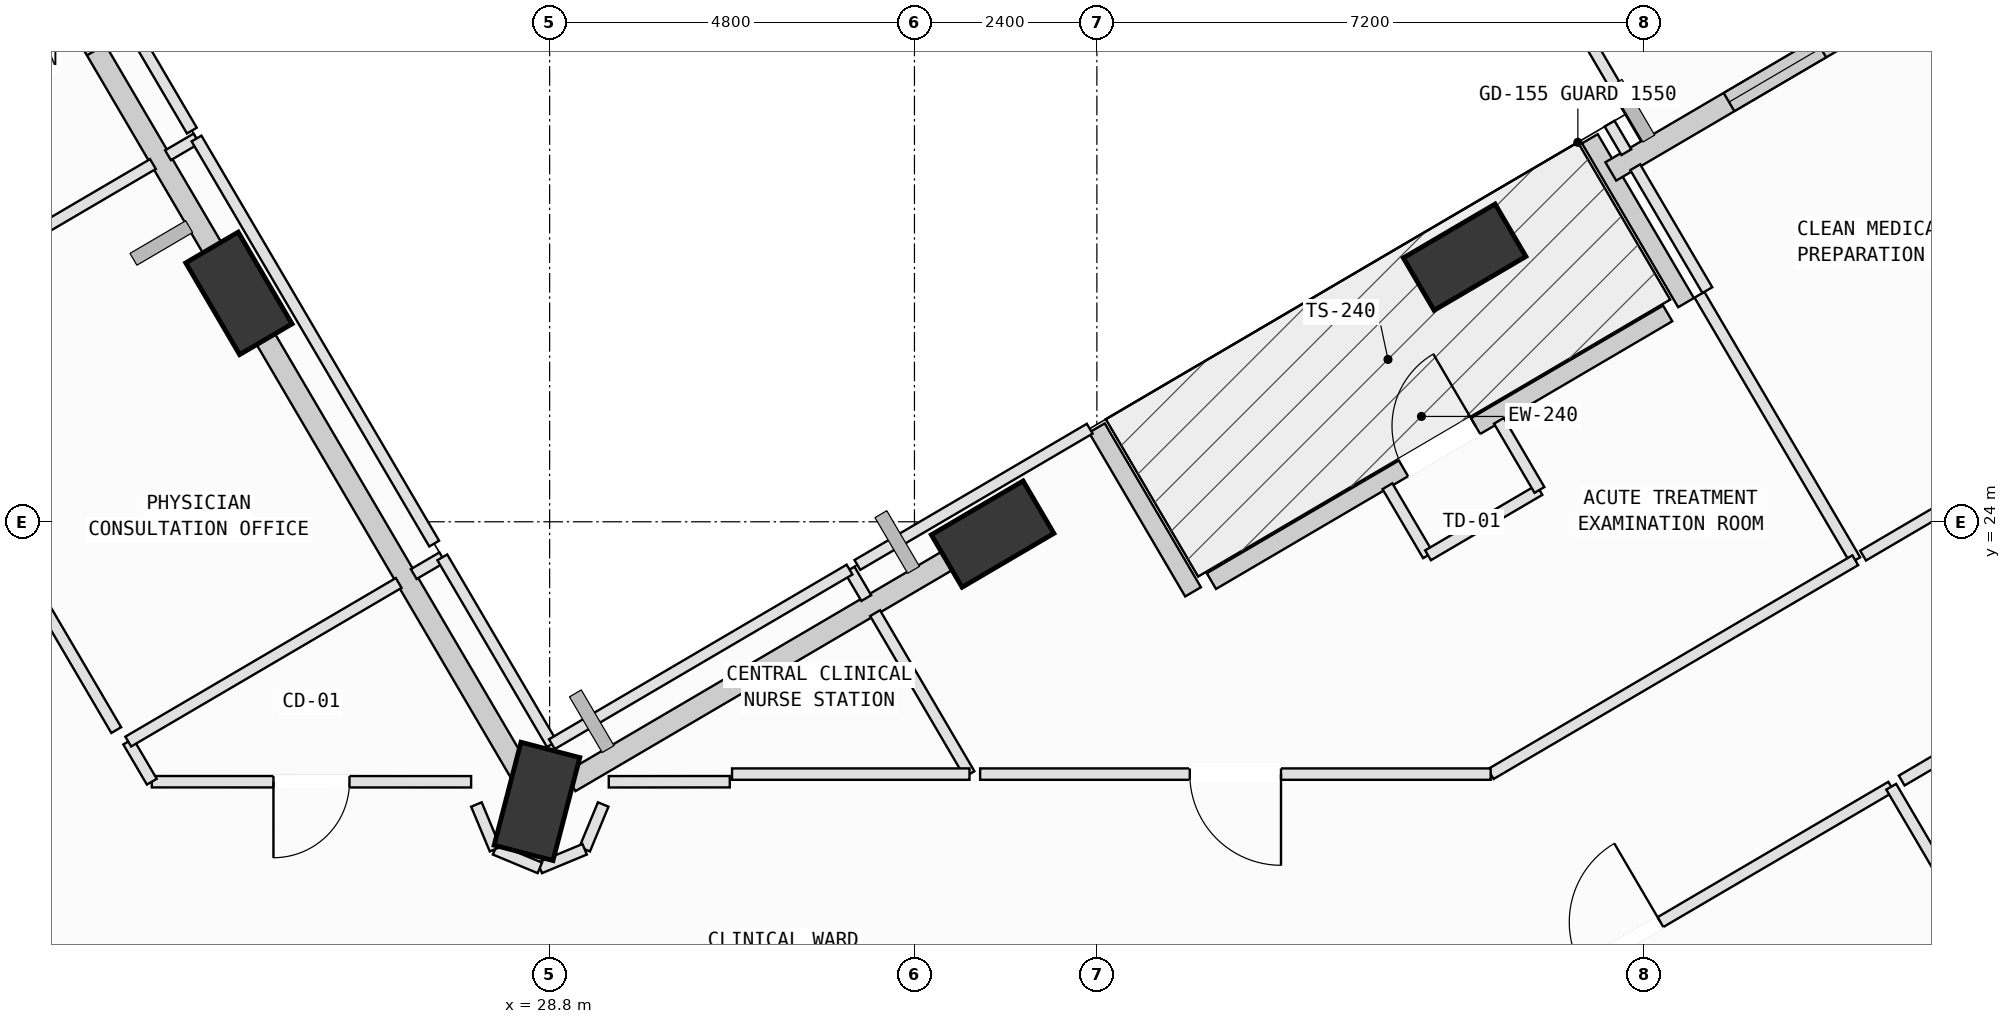
"""IFC4 building model, lengths in metres.
Left out: names, types, materials, properties, quantities, classifications, styles, units other than length and angle.
Written with IfcOpenShell. Run it as: python <this file> out.ifc"""

import sys

from ifc_helpers import new_model, si_unit, direction, frame, frame_2d, origin, origin_2d, place, context, subcontext, project, spatial, rectangle, extrude, element, fill, save


model = new_model("IFC4")
c1 = context("Model", 3, precision=1e-05, world=origin(), true_north=direction((0.0, 1.0)))
c2 = subcontext(c1, "Body", "Model", "MODEL_VIEW")
j1 = project(units=[si_unit("LENGTHUNIT", "METRE"), si_unit("PLANEANGLEUNIT", "RADIAN")], contexts=[c1])
p1 = place(None, origin())
s1 = spatial("IfcSite", under=j1, at=p1, CompositionType="ELEMENT")
p2 = place(p1, origin())
s2 = spatial("IfcBuilding", under=s1, at=p2, CompositionType="ELEMENT")
p3 = place(p2, frame((0.0, 0.0, 153.8)))
s3 = spatial("IfcBuildingStorey", under=s2, at=p3, CompositionType="ELEMENT", Elevation=153.8)
p4 = place(p3, frame((40.838, 27.481, 0.002), z_axis=(-0.011357121985, 0.029919299853, 0.999487794461), x_axis=(-0.626881403179, -0.778946373257, 0.016194256332)))
e1 = element("IfcColumn", 1, at=p4, inside=s3, PredefinedType="COLUMN", context=c2, shape_type="SweptSolid", body=[
    extrude(rectangle(XDim=1.4, YDim=0.8, at=origin_2d()), origin(), (0.0, 0.0, 1.0), 3.998),
])
p5 = place(p3, frame((34.628, 23.838, 0.002), z_axis=(0.003970853028, 0.004276303261, 0.999982972633), x_axis=(-0.976369771293, 0.216086439599, 0.002953019999)))
e2 = element("IfcColumn", 2, at=p5, inside=s3, PredefinedType="COLUMN", context=c2, shape_type="SweptSolid", body=[
    extrude(rectangle(XDim=1.4, YDim=0.8, at=origin_2d()), origin(), (0.0, 0.0, 1.0), 3.996),
])
p6 = place(p3, frame((28.634, 20.321, 0.002), z_axis=(0.018686718776, -0.020396614612, 0.999617319105), x_axis=(-0.467601093999, 0.883534166025, 0.026769280116)))
e3 = element("IfcColumn", 3, at=p6, inside=s3, PredefinedType="COLUMN", context=c2, shape_type="SweptSolid", body=[
    extrude(rectangle(XDim=1.4, YDim=0.8, at=origin_2d()), origin(), (0.0, 0.0, 1.0), 3.998),
])
p7 = place(p3, frame((24.712, 27.006, 0.002), z_axis=(-0.008851816593, -0.036933441647, 0.999278522851), x_axis=(-0.291217556867, 0.956095845125, 0.032757739664)))
e4 = element("IfcColumn", 4, at=p7, inside=s3, PredefinedType="COLUMN", context=c2, shape_type="SweptSolid", body=[
    extrude(rectangle(XDim=1.4, YDim=0.8, at=origin_2d()), origin(), (0.0, 0.0, 1.0), 3.999),
])
p8 = place(p3, frame((37.507, 23.22, 0.0), z_axis=(0.0, 0.0, 1.0), x_axis=(0.862517965363, 0.50602644143, 0.0)))
e5 = element("IfcWall", 5, at=p8, inside=s3, PredefinedType="SOLIDWALL", context=c2, shape_type="SweptSolid", body=[
    extrude(rectangle(XDim=6.96, YDim=0.24, at=frame_2d((3.48, 0.0))), origin(), (0.0, 0.0, 1.0), 3.165),
])
p9 = place(p8, frame((2.93, 0.0, 0.0)))
e6 = element("IfcOpeningElement", 6, at=p9, cuts=e5, PredefinedType="OPENING", context=c2, shape_type="SweptSolid", body=[
    extrude(rectangle(XDim=1.1, YDim=2.15, at=frame_2d((0.55, 1.075))), frame((0.0, 0.13, 0.0), z_axis=(0.0, -1.0, 0.0), x_axis=(1.0, 0.0, 0.0)), (0.0, 0.0, 1.0), 0.26),
])
for number, where, z_axis, x_axis in (
    (7, (36.0, 25.234, 0.0), (0.0, 0.0, 1.0), (0.506, -0.863, 0.0)),
    (8, (43.751, 26.883, 0.0), (0.0, 0.0, 1.0), (-0.506, 0.863, 0.0)),
):
    element("IfcWall", number, at=place(p3, frame(where, z_axis=z_axis, x_axis=x_axis)), inside=s3, PredefinedType="SOLIDWALL", context=c2, shape_type="SweptSolid", body=[
        extrude(rectangle(XDim=2.5, YDim=0.24, at=frame_2d((1.25, 0.0))), origin(), (0.0, 0.0, 1.0), 3.165),
    ])
p10 = place(p3, frame((42.762, 28.61, 0.0), z_axis=(0.0, 0.0, 1.0), x_axis=(0.862502800913, 0.506052288224, 0.0)))
e9 = element("IfcWall", 9, at=p10, inside=s3, PredefinedType="SOLIDWALL", context=c2, shape_type="SweptSolid", body=[
    extrude(rectangle(XDim=4.499, YDim=0.28, at=frame_2d((2.25, 0.0))), origin(), (0.0, 0.0, 1.0), 3.145),
])
p11 = place(p10, frame((1.803, 0.0, 0.75)))
e10 = element("IfcOpeningElement", 10, at=p11, cuts=e9, PredefinedType="OPENING", context=c2, shape_type="SweptSolid", body=[
    extrude(rectangle(XDim=1.4, YDim=1.85, at=frame_2d((0.7, 0.925))), frame((0.0, 0.15, 0.0), z_axis=(0.0, -1.0, 0.0), x_axis=(1.0, 0.0, 0.0)), (0.0, 0.0, 1.0), 0.3),
])
p12 = place(p3, frame((29.069, 20.577, 0.0), z_axis=(0.0, 0.0, 1.0), x_axis=(0.862522283586, 0.506019080981, 0.0)))
e11 = element("IfcWall", 11, at=p12, inside=s3, PredefinedType="SOLIDWALL", context=c2, shape_type="SweptSolid", body=[
    extrude(rectangle(XDim=5.96, YDim=0.28, at=frame_2d((2.98, 0.0))), origin(), (0.0, 0.0, 1.0), 3.165),
])
p13 = place(p3, frame((28.41, 20.702, 0.0), z_axis=(0.0, 0.0, 1.0), x_axis=(-0.50604756903, 0.862505569767, 0.0)))
e12 = element("IfcWall", 12, at=p13, inside=s3, PredefinedType="SOLIDWALL", context=c2, shape_type="SweptSolid", body=[
    extrude(rectangle(XDim=6.76, YDim=0.28, at=frame_2d((3.38, 0.0))), origin(), (0.0, 0.0, 1.0), 3.165),
])
p14 = place(p3, frame((24.49, 27.384, 0.0), z_axis=(0.0, 0.0, 1.0), x_axis=(-0.506018502958, 0.862522622697, 0.0)))
e13 = element("IfcWall", 13, at=p14, inside=s3, PredefinedType="SOLIDWALL", context=c2, shape_type="SweptSolid", body=[
    extrude(rectangle(XDim=6.223, YDim=0.28, at=frame_2d((3.111, 0.0))), origin(), (0.0, 0.0, 1.0), 3.165),
])
p15 = place(p14, frame((3.274, 0.0, 0.75)))
e14 = element("IfcOpeningElement", 14, at=p15, cuts=e13, PredefinedType="OPENING", context=c2, shape_type="SweptSolid", body=[
    extrude(rectangle(XDim=1.6, YDim=1.95, at=frame_2d((0.8, 0.975))), frame((0.0, 0.15, 0.0), z_axis=(0.0, -1.0, 0.0), x_axis=(1.0, 0.0, 0.0)), (0.0, 0.0, 1.0), 0.3),
])
p16 = place(p3, frame((39.344, 16.344, 0.0), z_axis=(0.0, 0.0, 1.0), x_axis=(0.862497317199, 0.506061634413, 0.0)))
e15 = element("IfcWall", 15, at=p16, inside=s3, PredefinedType="PARTITIONING", context=c2, shape_type="SweptSolid", body=[
    extrude(rectangle(XDim=8.24, YDim=0.15, at=frame_2d((4.12, 0.0))), origin(), (0.0, 0.0, 1.0), 3.78),
])
p17 = place(p16, frame((3.52, 0.0, 0.0)))
e16 = element("IfcOpeningElement", 16, at=p17, cuts=e15, PredefinedType="OPENING", context=c2, shape_type="SweptSolid", body=[
    extrude(rectangle(XDim=1.2, YDim=2.15, at=frame_2d((0.6, 1.075))), frame((0.0, 0.085, 0.0), z_axis=(0.0, -1.0, 0.0), x_axis=(1.0, 0.0, 0.0)), (0.0, 0.0, 1.0), 0.17),
])
p18 = place(p3, frame((46.451, 20.514, 0.0), z_axis=(0.0, 0.0, 1.0), x_axis=(0.506011364749, -0.86252681045, 0.0)))
e17 = element("IfcWall", 17, at=p18, inside=s3, PredefinedType="PARTITIONING", context=c2, shape_type="SweptSolid", body=[
    extrude(rectangle(XDim=11.935, YDim=0.15, at=frame_2d((5.967, 0.0))), origin(), (0.0, 0.0, 1.0), 3.415),
])
p19 = place(p3, frame((46.589, 20.595, 0.0), z_axis=(0.0, 0.0, 1.0), x_axis=(0.862575050657, 0.505929127433, 0.0)))
e18 = element("IfcWall", 18, at=p19, inside=s3, PredefinedType="PARTITIONING", context=c2, shape_type="SweptSolid", body=[
    extrude(rectangle(XDim=5.439, YDim=0.15, at=frame_2d((2.72, 0.0))), origin(), (0.0, 0.0, 1.0), 3.065),
])
p20 = place(p19, frame((2.12, 0.0, 0.0)))
e19 = element("IfcOpeningElement", 19, at=p20, cuts=e18, PredefinedType="OPENING", context=c2, shape_type="SweptSolid", body=[
    extrude(rectangle(XDim=1.2, YDim=2.15, at=frame_2d((0.6, 1.075))), frame((0.0, 0.085, 0.0), z_axis=(0.0, -1.0, 0.0), x_axis=(1.0, 0.0, 0.0)), (0.0, 0.0, 1.0), 0.17),
])
p21 = place(p3, frame((32.746, 23.371, 0.0), z_axis=(0.0, 0.0, 1.0), x_axis=(0.505964477981, -0.862554315404, 0.0)))
e20 = element("IfcWall", 20, at=p21, inside=s3, PredefinedType="PARTITIONING", context=c2, shape_type="SweptSolid", body=[
    extrude(rectangle(XDim=0.435, YDim=0.15, at=frame_2d((0.217, 0.0))), origin(), (0.0, 0.0, 1.0), 3.78),
])
p22 = place(p3, frame((33.082, 22.798, 0.0), z_axis=(0.0, 0.0, 1.0), x_axis=(0.505798601348, -0.862651595301, 0.0)))
e21 = element("IfcWall", 21, at=p22, inside=s3, PredefinedType="PARTITIONING", context=c2, shape_type="SweptSolid", body=[
    extrude(rectangle(XDim=2.455, YDim=0.15, at=frame_2d((1.228, 0.0))), origin(), (0.0, 0.0, 1.0), 3.78),
])
p23 = place(p3, frame((34.324, 20.68, 0.0), z_axis=(0.0, 0.0, 1.0), x_axis=(-1.0, 0.0, 0.0)))
e22 = element("IfcWall", 22, at=p23, inside=s3, PredefinedType="PARTITIONING", context=c2, shape_type="SweptSolid", body=[
    extrude(rectangle(XDim=3.124, YDim=0.15, at=frame_2d((1.562, 0.0))), origin(), (0.0, 0.0, 1.0), 3.78),
])
p24 = place(p3, frame((31.17, 20.58, 0.0), z_axis=(0.0, 0.0, 1.0), x_axis=(-0.999999811869, -0.000613402737, 0.0)))
e23 = element("IfcWall", 23, at=p24, inside=s3, PredefinedType="PARTITIONING", context=c2, shape_type="SweptSolid", body=[
    extrude(rectangle(XDim=1.592, YDim=0.15, at=frame_2d((0.796, 0.0))), origin(), (0.0, 0.0, 1.0), 3.78),
])
p25 = place(p3, frame((29.505, 20.28, 0.0), z_axis=(0.0, 0.0, 1.0), x_axis=(-0.382520885967, -0.923946844683, 0.0)))
e24 = element("IfcWall", 24, at=p25, inside=s3, PredefinedType="PARTITIONING", context=c2, shape_type="SweptSolid", body=[
    extrude(rectangle(XDim=0.638, YDim=0.15, at=frame_2d((0.319, 0.0))), origin(), (0.0, 0.0, 1.0), 3.78),
])
p26 = place(p3, frame((29.261, 19.691, 0.0), z_axis=(0.0, 0.0, 1.0), x_axis=(-0.923629954024, -0.383285413275, 0.0)))
e25 = element("IfcWall", 25, at=p26, inside=s3, PredefinedType="PARTITIONING", context=c2, shape_type="SweptSolid", body=[
    extrude(rectangle(XDim=0.639, YDim=0.15, at=frame_2d((0.319, 0.0))), origin(), (0.0, 0.0, 1.0), 3.78),
])
p27 = place(p3, frame((28.671, 19.446, 0.0), z_axis=(0.0, 0.0, 1.0), x_axis=(-0.92334851348, 0.383962918333, 0.0)))
e26 = element("IfcWall", 26, at=p27, inside=s3, PredefinedType="PARTITIONING", context=c2, shape_type="SweptSolid", body=[
    extrude(rectangle(XDim=0.638, YDim=0.15, at=frame_2d((0.319, 0.0))), origin(), (0.0, 0.0, 1.0), 3.78),
])
p28 = place(p3, frame((28.082, 19.691, 0.0), z_axis=(0.0, 0.0, 1.0), x_axis=(-0.384153472045, 0.92326925104, 0.0)))
e27 = element("IfcWall", 27, at=p28, inside=s3, PredefinedType="PARTITIONING", context=c2, shape_type="SweptSolid", body=[
    extrude(rectangle(XDim=0.638, YDim=0.15, at=frame_2d((0.319, 0.0))), origin(), (0.0, 0.0, 1.0), 3.78),
])
p29 = place(p3, frame((27.767, 20.579, 0.0), z_axis=(0.0, 0.0, 1.0), x_axis=(-0.999999972983, 0.000232450017, 0.0)))
e28 = element("IfcWall", 28, at=p29, inside=s3, PredefinedType="PARTITIONING", context=c2, shape_type="SweptSolid", body=[
    extrude(rectangle(XDim=4.201, YDim=0.15, at=frame_2d((2.101, 0.0))), origin(), (0.0, 0.0, 1.0), 3.78),
])
p30 = place(p29, frame((1.601, 0.0, 0.0)))
e29 = element("IfcOpeningElement", 29, at=p30, cuts=e28, PredefinedType="OPENING", context=c2, shape_type="SweptSolid", body=[
    extrude(rectangle(XDim=1.0, YDim=2.12, at=frame_2d((0.5, 1.06))), frame((0.0, 0.085, 0.0), z_axis=(0.0, -1.0, 0.0), x_axis=(1.0, 0.0, 0.0)), (0.0, 0.0, 1.0), 0.17),
])
p31 = place(p3, frame((23.566, 20.58, 0.0), z_axis=(0.0, 0.0, 1.0), x_axis=(-0.506200568764, 0.862415783821, 0.0)))
e30 = element("IfcWall", 30, at=p31, inside=s3, PredefinedType="PARTITIONING", context=c2, shape_type="SweptSolid", body=[
    extrude(rectangle(XDim=0.612, YDim=0.15, at=frame_2d((0.306, 0.0))), origin(), (0.0, 0.0, 1.0), 3.78),
])
p32 = place(p3, frame((23.256, 21.108, 0.0), z_axis=(0.0, 0.0, 1.0), x_axis=(0.862537649449, 0.50599288857, 0.0)))
e31 = element("IfcWall", 31, at=p32, inside=s3, PredefinedType="PARTITIONING", context=c2, shape_type="SweptSolid", body=[
    extrude(rectangle(XDim=4.125, YDim=0.15, at=frame_2d((2.062, 0.0))), origin(), (0.0, 0.0, 1.0), 3.78),
])
p33 = place(p3, frame((27.012, 23.312, 0.0), z_axis=(0.0, 0.0, 1.0), x_axis=(0.863127684472, 0.504985742668, 0.0)))
e32 = element("IfcWall", 32, at=p33, inside=s3, PredefinedType="PARTITIONING", context=c2, shape_type="SweptSolid", body=[
    extrude(rectangle(XDim=0.436, YDim=0.15, at=frame_2d((0.218, 0.0))), origin(), (0.0, 0.0, 1.0), 3.78),
])
p34 = place(p3, frame((27.388, 23.532, 0.0), z_axis=(0.0, 0.0, 1.0), x_axis=(0.506042653576, -0.862508453733, 0.0)))
e33 = element("IfcWall", 33, at=p34, inside=s3, PredefinedType="PARTITIONING", context=c2, shape_type="SweptSolid", body=[
    extrude(rectangle(XDim=2.85, YDim=0.15, at=frame_2d((1.425, 0.0))), origin(), (0.0, 0.0, 1.0), 3.78),
])
p35 = place(p3, frame((28.83, 21.074, 0.0), z_axis=(0.0, 0.0, 1.0), x_axis=(0.862551504048, 0.505969270672, 0.0)))
e34 = element("IfcWall", 34, at=p35, inside=s3, PredefinedType="PARTITIONING", context=c2, shape_type="SweptSolid", body=[
    extrude(rectangle(XDim=4.54, YDim=0.15, at=frame_2d((2.27, 0.0))), origin(), (0.0, 0.0, 1.0), 3.78),
])
p36 = place(p3, frame((39.823, 24.468, 0.0), z_axis=(0.0, 0.0, 1.0), x_axis=(0.506503852919, -0.862237697493, 0.0)))
e35 = element("IfcWall", 35, at=p36, inside=s3, PredefinedType="PARTITIONING", context=c2, shape_type="SweptSolid", body=[
    extrude(rectangle(XDim=1.054, YDim=0.15, at=frame_2d((0.527, 0.0))), origin(), (0.0, 0.0, 1.0), 3.78),
])
p37 = place(p3, frame((40.357, 23.559, 0.0), z_axis=(0.0, 0.0, 1.0), x_axis=(0.86258341397, 0.505914868277, 0.0)))
e36 = element("IfcWall", 36, at=p37, inside=s3, PredefinedType="PARTITIONING", context=c2, shape_type="SweptSolid", body=[
    extrude(rectangle(XDim=1.7, YDim=0.15, at=frame_2d((0.85, 0.0))), origin(), (0.0, 0.0, 1.0), 3.415),
])
p38 = place(p3, frame((41.823, 24.419, 0.0), z_axis=(0.0, 0.0, 1.0), x_axis=(-0.505309547825, 0.862938155882, 0.0)))
e37 = element("IfcWall", 37, at=p38, inside=s3, PredefinedType="PARTITIONING", context=c2, shape_type="SweptSolid", body=[
    extrude(rectangle(XDim=1.055, YDim=0.15, at=frame_2d((0.527, 0.0))), origin(), (0.0, 0.0, 1.0), 3.78),
])
p39 = place(p3, frame((43.928, 26.987, 0.0), z_axis=(0.0, 0.0, 1.0), x_axis=(0.506147939122, -0.862446672973, 0.0)))
e38 = element("IfcWall", 38, at=p39, inside=s3, PredefinedType="PARTITIONING", context=c2, shape_type="SweptSolid", body=[
    extrude(rectangle(XDim=4.05, YDim=0.15, at=frame_2d((2.025, 0.0))), origin(), (0.0, 0.0, 1.0), 3.415),
])
p40 = place(p3, frame((45.978, 23.494, 0.0), z_axis=(0.0, 0.0, 1.0), x_axis=(-0.862551983002, -0.505968454175, 0.0)))
e39 = element("IfcWall", 39, at=p40, inside=s3, PredefinedType="PARTITIONING", context=c2, shape_type="SweptSolid", body=[
    extrude(rectangle(XDim=5.562, YDim=0.15, at=frame_2d((2.781, 0.0))), origin(), (0.0, 0.0, 1.0), 3.78),
])
p41 = place(p3, frame((41.181, 20.68, 0.0), z_axis=(0.0, 0.0, 1.0), x_axis=(-1.0, 0.0, 0.0)))
e40 = element("IfcWall", 40, at=p41, inside=s3, PredefinedType="PARTITIONING", context=c2, shape_type="SweptSolid", body=[
    extrude(rectangle(XDim=6.717, YDim=0.15, at=frame_2d((3.358, 0.0))), origin(), (0.0, 0.0, 1.0), 3.415),
])
p42 = place(p41, frame((2.759, 0.0, 0.0)))
e41 = element("IfcOpeningElement", 41, at=p42, cuts=e40, PredefinedType="OPENING", context=c2, shape_type="SweptSolid", body=[
    extrude(rectangle(XDim=1.2, YDim=2.15, at=frame_2d((0.6, 1.075))), frame((0.0, 0.085, 0.0), z_axis=(0.0, -1.0, 0.0), x_axis=(1.0, 0.0, 0.0)), (0.0, 0.0, 1.0), 0.17),
])
p43 = place(p3, frame((32.849, 23.432, 0.0), z_axis=(0.0, 0.0, 1.0), x_axis=(0.862544548307, 0.50598112829, 0.0)))
e42 = element("IfcWall", 42, at=p43, inside=s3, PredefinedType="PARTITIONING", context=c2, shape_type="SweptSolid", body=[
    extrude(rectangle(XDim=3.544, YDim=0.15, at=frame_2d((1.772, 0.0))), origin(), (0.0, 0.0, 1.0), 3.78),
])
p44 = place(p3, frame((52.382, 27.251, 0.0), z_axis=(0.0, 0.0, 1.0), x_axis=(-0.862558161186, -0.50595792174, 0.0)))
e43 = element("IfcWall", 43, at=p44, inside=s3, PredefinedType="PARTITIONING", context=c2, shape_type="SweptSolid", body=[
    extrude(rectangle(XDim=7.305, YDim=0.15, at=frame_2d((3.652, 0.0))), origin(), (0.0, 0.0, 1.0), 3.78),
])
p45 = place(p44, frame((3.052, 0.0, 0.0)))
e44 = element("IfcOpeningElement", 44, at=p45, cuts=e43, PredefinedType="OPENING", context=c2, shape_type="SweptSolid", body=[
    extrude(rectangle(XDim=1.2, YDim=2.15, at=frame_2d((0.6, 1.075))), frame((0.0, 0.085, 0.0), z_axis=(0.0, -1.0, 0.0), x_axis=(1.0, 0.0, 0.0)), (0.0, 0.0, 1.0), 0.17),
])
p46 = place(p3, frame((44.032, 27.048, 0.0), z_axis=(0.0, 0.0, 1.0), x_axis=(-0.506160564265, 0.862439263475, 0.0)))
e45 = element("IfcWall", 45, at=p46, inside=s3, PredefinedType="PARTITIONING", context=c2, shape_type="SweptSolid", body=[
    extrude(rectangle(XDim=1.875, YDim=0.15, at=frame_2d((0.938, 0.0))), origin(), (0.0, 0.0, 1.0), 3.78),
])
p47 = place(p3, frame((42.966, 28.863, 0.0), z_axis=(0.0, 0.0, 1.0), x_axis=(-0.504985742668, 0.863127684472, 0.0)))
e46 = element("IfcWall", 46, at=p47, inside=s3, PredefinedType="PARTITIONING", context=c2, shape_type="SweptSolid", body=[
    extrude(rectangle(XDim=0.436, YDim=0.15, at=frame_2d((0.218, 0.0))), origin(), (0.0, 0.0, 1.0), 3.78),
])
p48 = place(p3, frame((43.215, 29.062, 0.0), z_axis=(0.0, 0.0, 1.0), x_axis=(-0.505874334541, 0.862607186182, 0.0)))
e47 = element("IfcWall", 47, at=p48, inside=s3, PredefinedType="PARTITIONING", context=c2, shape_type="SweptSolid", body=[
    extrude(rectangle(XDim=2.59, YDim=0.15, at=frame_2d((1.295, 0.0))), origin(), (0.0, 0.0, 1.0), 3.78),
])
p49 = place(p3, frame((23.098, 21.259, 0.0), z_axis=(0.0, 0.0, 1.0), x_axis=(-0.506011476282, 0.862526745018, 0.0)))
e48 = element("IfcWall", 48, at=p49, inside=s3, PredefinedType="PARTITIONING", context=c2, shape_type="SweptSolid", body=[
    extrude(rectangle(XDim=6.18, YDim=0.15, at=frame_2d((3.09, 0.0))), origin(), (0.0, 0.0, 1.0), 3.78),
])
p50 = place(p49, frame((2.49, 0.0, 0.0)))
e49 = element("IfcOpeningElement", 49, at=p50, cuts=e48, PredefinedType="OPENING", context=c2, shape_type="SweptSolid", body=[
    extrude(rectangle(XDim=1.2, YDim=2.15, at=frame_2d((0.6, 1.075))), frame((0.0, 0.085, 0.0), z_axis=(0.0, -1.0, 0.0), x_axis=(1.0, 0.0, 0.0)), (0.0, 0.0, 1.0), 0.17),
])
p51 = place(p3, frame((19.971, 26.589, 0.0), z_axis=(0.0, 0.0, 1.0), x_axis=(0.86252592409, 0.506012875599, 0.0)))
e50 = element("IfcWall", 50, at=p51, inside=s3, PredefinedType="PARTITIONING", context=c2, shape_type="SweptSolid", body=[
    extrude(rectangle(XDim=4.186, YDim=0.15, at=frame_2d((2.093, 0.0))), origin(), (0.0, 0.0, 1.0), 3.78),
])
p52 = place(p3, frame((23.779, 28.823, 0.0), z_axis=(0.0, 0.0, 1.0), x_axis=(0.862554315404, 0.505964477981, 0.0)))
e51 = element("IfcWall", 51, at=p52, inside=s3, PredefinedType="PARTITIONING", context=c2, shape_type="SweptSolid", body=[
    extrude(rectangle(XDim=0.435, YDim=0.15, at=frame_2d((0.217, 0.0))), origin(), (0.0, 0.0, 1.0), 3.78),
])
p53 = place(p3, frame((24.154, 29.043, 0.0), z_axis=(0.0, 0.0, 1.0), x_axis=(0.506011476282, -0.862526745018, 0.0)))
e52 = element("IfcWall", 52, at=p53, inside=s3, PredefinedType="PARTITIONING", context=c2, shape_type="SweptSolid", body=[
    extrude(rectangle(XDim=6.18, YDim=0.15, at=frame_2d((3.09, 0.0))), origin(), (0.0, 0.0, 1.0), 3.78),
])
p54 = place(p3, frame((21.32, 33.873, 0.0), z_axis=(0.0, 0.0, 1.0), x_axis=(0.506057922568, -0.862499495076, 0.0)))
e53 = element("IfcWall", 53, at=p54, inside=s3, PredefinedType="PARTITIONING", context=c2, shape_type="SweptSolid", body=[
    extrude(rectangle(XDim=5.479, YDim=0.15, at=frame_2d((2.74, 0.0))), origin(), (0.0, 0.0, 1.0), 3.78),
])
p55 = place(p9, origin())
e54 = element("IfcDoor", 54, at=p55, inside=s3, OperationType="SINGLE_SWING_RIGHT", PredefinedType="DOOR", context=c2, shape_type="SweptSolid", body=[
    extrude(rectangle(XDim=1.1, YDim=2.15, at=frame_2d((0.55, 1.075))), frame((0.0, 0.025, 0.0), z_axis=(0.0, -1.0, 0.0), x_axis=(1.0, 0.0, 0.0)), (0.0, 0.0, 1.0), 0.05),
])
fill(e6, e54)
p56 = place(p11, origin())
e55 = element("IfcWindow", 55, at=p56, inside=s3, PartitioningType="SINGLE_PANEL", PredefinedType="WINDOW", context=c2, shape_type="SweptSolid", body=[
    extrude(rectangle(XDim=1.4, YDim=1.85, at=frame_2d((0.7, 0.925))), frame((0.0, 0.03, 0.0), z_axis=(0.0, -1.0, 0.0), x_axis=(1.0, 0.0, 0.0)), (0.0, 0.0, 1.0), 0.06),
])
fill(e10, e55)
p57 = place(p17, origin())
e56 = element("IfcDoor", 56, at=p57, inside=s3, OperationType="SINGLE_SWING_RIGHT", PredefinedType="DOOR", context=c2, shape_type="SweptSolid", body=[
    extrude(rectangle(XDim=1.2, YDim=2.15, at=frame_2d((0.6, 1.075))), frame((0.0, 0.025, 0.0), z_axis=(0.0, -1.0, 0.0), x_axis=(1.0, 0.0, 0.0)), (0.0, 0.0, 1.0), 0.05),
])
fill(e16, e56)
p58 = place(p30, origin())
e57 = element("IfcDoor", 57, at=p58, inside=s3, OperationType="SINGLE_SWING_RIGHT", PredefinedType="DOOR", context=c2, shape_type="SweptSolid", body=[
    extrude(rectangle(XDim=1.0, YDim=2.12, at=frame_2d((0.5, 1.06))), frame((0.0, 0.025, 0.0), z_axis=(0.0, -1.0, 0.0), x_axis=(1.0, 0.0, 0.0)), (0.0, 0.0, 1.0), 0.05),
])
fill(e29, e57)
p59 = place(p42, origin())
e58 = element("IfcDoor", 58, at=p59, inside=s3, OperationType="SINGLE_SWING_LEFT", PredefinedType="DOOR", context=c2, shape_type="SweptSolid", body=[
    extrude(rectangle(XDim=1.2, YDim=2.15, at=frame_2d((0.6, 1.075))), frame((0.0, 0.025, 0.0), z_axis=(0.0, -1.0, 0.0), x_axis=(1.0, 0.0, 0.0)), (0.0, 0.0, 1.0), 0.05),
])
fill(e41, e58)
save(model, sys.argv[1])
